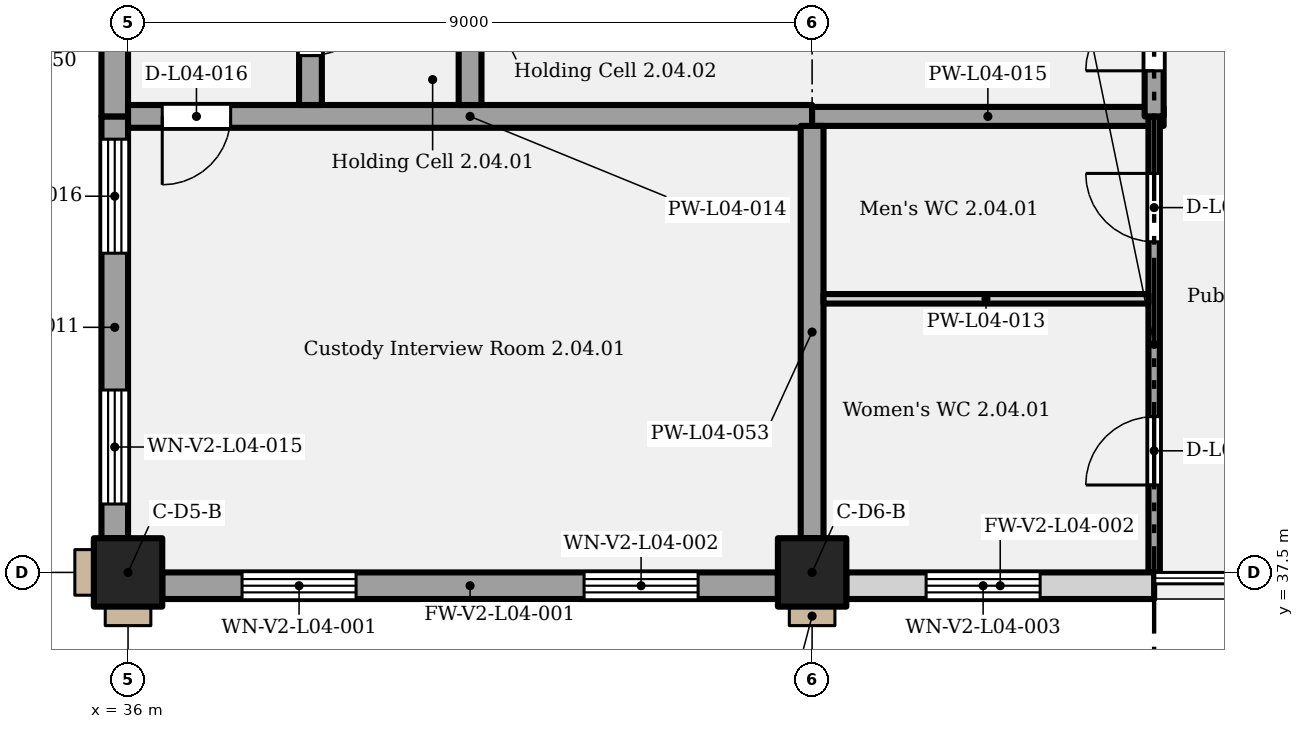
"""IFC4 building model, lengths in metres.
Left out: names, types, materials, properties, quantities, classifications, styles, units other than length and angle.
Written with IfcOpenShell. Run it as: python <this file> out.ifc"""

import sys

from ifc_helpers import new_model, si_unit, direction, frame, frame_2d, origin, origin_2d, place, context, subcontext, project, spatial, rectangle, extrude, element, fill, save


model = new_model("IFC4")
c1 = context("Model", 3, precision=1e-05, world=origin(), true_north=direction((0.0, 1.0)))
c2 = subcontext(c1, "Body", "Model", "MODEL_VIEW")
j1 = project(units=[si_unit("LENGTHUNIT", "METRE"), si_unit("PLANEANGLEUNIT", "RADIAN")], contexts=[c1])
p1 = place(None, origin())
s1 = spatial("IfcSite", under=j1, at=p1, CompositionType="ELEMENT")
p2 = place(p1, origin())
s2 = spatial("IfcBuilding", under=s1, at=p2, CompositionType="ELEMENT")
p3 = place(p2, frame((0.0, 0.0, 22.8)))
s3 = spatial("IfcBuildingStorey", under=s2, at=p3, CompositionType="ELEMENT", Elevation=22.8)
for number, where, z_axis, x_axis in (
    (1, (36.0, 37.5, 0.0), (0.0, 0.0, 1.0), (1.0, 0.0, 0.0)),
    (2, (45.0, 37.5, 0.0), (0.0, 0.0, 1.0), (1.0, 0.0, 0.0)),
):
    element("IfcColumn", number, at=place(p3, frame(where, z_axis=z_axis, x_axis=x_axis)), inside=s3, PredefinedType="COLUMN", context=c2, shape_type="SweptSolid", body=[
        extrude(rectangle(XDim=0.9, YDim=0.9, at=origin_2d()), origin(), (0.0, 0.0, 1.0), 5.4),
    ])
p4 = place(p3, frame((36.45, 37.325, 0.0), z_axis=(0.0, 0.0, 1.0), x_axis=(1.0, 0.0, 0.0)))
e3 = element("IfcWall", 3, at=p4, inside=s3, PredefinedType="SOLIDWALL", context=c2, shape_type="SweptSolid", body=[
    extrude(rectangle(XDim=8.1, YDim=0.35, at=frame_2d((4.05, 0.0))), origin(), (0.0, 0.0, 1.0), 5.15),
])
p5 = place(p4, frame((1.05, 0.0, 1.05)))
e4 = element("IfcOpeningElement", 4, at=p5, cuts=e3, PredefinedType="OPENING", context=c2, shape_type="SweptSolid", body=[
    extrude(rectangle(XDim=1.5, YDim=3.5, at=frame_2d((0.75, 1.75))), frame((0.0, 0.185, 0.0), z_axis=(0.0, -1.0, 0.0), x_axis=(1.0, 0.0, 0.0)), (0.0, 0.0, 1.0), 0.37),
])
p6 = place(p4, frame((5.55, 0.0, 1.05)))
e5 = element("IfcOpeningElement", 5, at=p6, cuts=e3, PredefinedType="OPENING", context=c2, shape_type="SweptSolid", body=[
    extrude(rectangle(XDim=1.5, YDim=3.5, at=frame_2d((0.75, 1.75))), frame((0.0, 0.185, 0.0), z_axis=(0.0, -1.0, 0.0), x_axis=(1.0, 0.0, 0.0)), (0.0, 0.0, 1.0), 0.37),
])
p7 = place(p3, frame((45.45, 37.325, 0.0), z_axis=(0.0, 0.0, 1.0), x_axis=(1.0, 0.0, 0.0)))
e6 = element("IfcWall", 6, at=p7, inside=s3, PredefinedType="SOLIDWALL", context=c2, shape_type="SweptSolid", body=[
    extrude(rectangle(XDim=4.05, YDim=0.35, at=frame_2d((2.025, 0.0))), origin(), (0.0, 0.0, 1.0), 5.15),
])
p8 = place(p7, frame((1.05, 0.0, 1.05)))
e7 = element("IfcOpeningElement", 7, at=p8, cuts=e6, PredefinedType="OPENING", context=c2, shape_type="SweptSolid", body=[
    extrude(rectangle(XDim=1.5, YDim=3.5, at=frame_2d((0.75, 1.75))), frame((0.0, 0.185, 0.0), z_axis=(0.0, -1.0, 0.0), x_axis=(1.0, 0.0, 0.0)), (0.0, 0.0, 1.0), 0.37),
])
p9 = place(p3, frame((35.825, 37.95, 0.0), z_axis=(0.0, 0.0, 1.0), x_axis=(0.0, 1.0, 0.0)))
e8 = element("IfcWall", 8, at=p9, inside=s3, PredefinedType="SOLIDWALL", context=c2, shape_type="SweptSolid", body=[
    extrude(rectangle(XDim=5.55, YDim=0.35, at=frame_2d((2.775, 0.0))), origin(), (0.0, 0.0, 1.0), 5.15),
])
p10 = place(p9, frame((0.45, 0.0, 1.05)))
e9 = element("IfcOpeningElement", 9, at=p10, cuts=e8, PredefinedType="OPENING", context=c2, shape_type="SweptSolid", body=[
    extrude(rectangle(XDim=1.5, YDim=3.5, at=frame_2d((0.75, 1.75))), frame((0.0, 0.185, 0.0), z_axis=(0.0, -1.0, 0.0), x_axis=(1.0, 0.0, 0.0)), (0.0, 0.0, 1.0), 0.37),
])
p11 = place(p9, frame((3.75, 0.0, 1.05)))
e10 = element("IfcOpeningElement", 10, at=p11, cuts=e8, PredefinedType="OPENING", context=c2, shape_type="SweptSolid", body=[
    extrude(rectangle(XDim=1.5, YDim=3.5, at=frame_2d((0.75, 1.75))), frame((0.0, 0.185, 0.0), z_axis=(0.0, -1.0, 0.0), x_axis=(1.0, 0.0, 0.0)), (0.0, 0.0, 1.0), 0.37),
])
p12 = place(p3, frame((35.825, 43.5, 0.0), z_axis=(0.0, 0.0, 1.0), x_axis=(0.0, 1.0, 0.0)))
e11 = element("IfcWall", 11, at=p12, inside=s3, PredefinedType="SOLIDWALL", context=c2, shape_type="SweptSolid", body=[
    extrude(rectangle(XDim=10.05, YDim=0.35, at=frame_2d((5.025, 0.0))), origin(), (0.0, 0.0, 1.0), 5.15),
])
p13 = place(p12, frame((1.5, 0.0, 1.05)))
e12 = element("IfcOpeningElement", 12, at=p13, cuts=e11, PredefinedType="OPENING", context=c2, shape_type="SweptSolid", body=[
    extrude(rectangle(XDim=1.5, YDim=3.5, at=frame_2d((0.75, 1.75))), frame((0.0, 0.185, 0.0), z_axis=(0.0, -1.0, 0.0), x_axis=(1.0, 0.0, 0.0)), (0.0, 0.0, 1.0), 0.37),
])
p14 = place(p12, frame((4.8, 0.0, 1.05)))
e13 = element("IfcOpeningElement", 13, at=p14, cuts=e11, PredefinedType="OPENING", context=c2, shape_type="SweptSolid", body=[
    extrude(rectangle(XDim=1.5, YDim=3.5, at=frame_2d((0.75, 1.75))), frame((0.0, 0.185, 0.0), z_axis=(0.0, -1.0, 0.0), x_axis=(1.0, 0.0, 0.0)), (0.0, 0.0, 1.0), 0.37),
])
p15 = place(p12, frame((8.1, 0.0, 1.05)))
e14 = element("IfcOpeningElement", 14, at=p15, cuts=e11, PredefinedType="OPENING", context=c2, shape_type="SweptSolid", body=[
    extrude(rectangle(XDim=1.5, YDim=3.5, at=frame_2d((0.75, 1.75))), frame((0.0, 0.185, 0.0), z_axis=(0.0, -1.0, 0.0), x_axis=(1.0, 0.0, 0.0)), (0.0, 0.0, 1.0), 0.37),
])
p16 = place(p3, frame((45.15, 41.1, 0.0), z_axis=(0.0, 0.0, 1.0), x_axis=(1.0, 0.0, 0.0)))
e15 = element("IfcWall", 15, at=p16, inside=s3, PredefinedType="PARTITIONING", context=c2, shape_type="SweptSolid", body=[
    extrude(rectangle(XDim=4.275, YDim=0.125, at=frame_2d((2.138, 0.0))), origin(), (0.0, 0.0, 1.0), 5.15),
])
p17 = place(p3, frame((36.0, 43.5, 0.0), z_axis=(0.0, 0.0, 1.0), x_axis=(1.0, 0.0, 0.0)))
e16 = element("IfcWall", 16, at=p17, inside=s3, PredefinedType="PARTITIONING", context=c2, shape_type="SweptSolid", body=[
    extrude(rectangle(XDim=9.0, YDim=0.3, at=frame_2d((4.5, 0.0))), origin(), (0.0, 0.0, 1.0), 5.15),
])
p18 = place(p17, frame((1.35, 0.0, 0.0), z_axis=(0.0, 0.0, 1.0), x_axis=(-1.0, 0.0, 0.0)))
e17 = element("IfcOpeningElement", 17, at=p18, cuts=e16, PredefinedType="OPENING", context=c2, shape_type="SweptSolid", body=[
    extrude(rectangle(XDim=0.9, YDim=2.1, at=frame_2d((0.45, 1.05))), frame((0.0, 0.16, 0.0), z_axis=(0.0, -1.0, 0.0), x_axis=(1.0, 0.0, 0.0)), (0.0, 0.0, 1.0), 0.32),
])
p19 = place(p3, frame((45.0, 43.5, 0.0), z_axis=(0.0, 0.0, 1.0), x_axis=(1.0, 0.0, 0.0)))
e18 = element("IfcWall", 18, at=p19, inside=s3, PredefinedType="PARTITIONING", context=c2, shape_type="SweptSolid", body=[
    extrude(rectangle(XDim=4.625, YDim=0.25, at=frame_2d((2.312, 0.0))), origin(), (0.0, 0.0, 1.0), 5.15),
])
p20 = place(p3, frame((38.4, 43.65, 0.0), z_axis=(0.0, 0.0, 1.0), x_axis=(0.0, 1.0, 0.0)))
e19 = element("IfcWall", 19, at=p20, inside=s3, PredefinedType="PARTITIONING", context=c2, shape_type="SweptSolid", body=[
    extrude(rectangle(XDim=10.35, YDim=0.3, at=frame_2d((5.175, 0.0))), origin(), (0.0, 0.0, 1.0), 5.15),
])
p21 = place(p20, frame((1.55, 0.0, 0.0), z_axis=(0.0, 0.0, 1.0), x_axis=(-1.0, 0.0, 0.0)))
e20 = element("IfcOpeningElement", 20, at=p21, cuts=e19, PredefinedType="OPENING", context=c2, shape_type="SweptSolid", body=[
    extrude(rectangle(XDim=0.9, YDim=2.0, at=frame_2d((0.45, 1.0))), frame((0.0, 0.16, 0.0), z_axis=(0.0, -1.0, 0.0), x_axis=(1.0, 0.0, 0.0)), (0.0, 0.0, 1.0), 0.32),
])
p22 = place(p20, frame((4.05, 0.0, 0.0), z_axis=(0.0, 0.0, 1.0), x_axis=(-1.0, 0.0, 0.0)))
e21 = element("IfcOpeningElement", 21, at=p22, cuts=e19, PredefinedType="OPENING", context=c2, shape_type="SweptSolid", body=[
    extrude(rectangle(XDim=0.9, YDim=2.0, at=frame_2d((0.45, 1.0))), frame((0.0, 0.16, 0.0), z_axis=(0.0, -1.0, 0.0), x_axis=(1.0, 0.0, 0.0)), (0.0, 0.0, 1.0), 0.32),
])
p23 = place(p20, frame((6.55, 0.0, 0.0), z_axis=(0.0, 0.0, 1.0), x_axis=(-1.0, 0.0, 0.0)))
e22 = element("IfcOpeningElement", 22, at=p23, cuts=e19, PredefinedType="OPENING", context=c2, shape_type="SweptSolid", body=[
    extrude(rectangle(XDim=0.9, YDim=2.0, at=frame_2d((0.45, 1.0))), frame((0.0, 0.16, 0.0), z_axis=(0.0, -1.0, 0.0), x_axis=(1.0, 0.0, 0.0)), (0.0, 0.0, 1.0), 0.32),
])
p24 = place(p20, frame((9.3, 0.0, 0.0), z_axis=(0.0, 0.0, 1.0), x_axis=(-1.0, 0.0, 0.0)))
e23 = element("IfcOpeningElement", 23, at=p24, cuts=e19, PredefinedType="OPENING", context=c2, shape_type="SweptSolid", body=[
    extrude(rectangle(XDim=0.9, YDim=2.0, at=frame_2d((0.45, 1.0))), frame((0.0, 0.16, 0.0), z_axis=(0.0, -1.0, 0.0), x_axis=(1.0, 0.0, 0.0)), (0.0, 0.0, 1.0), 0.32),
])
p25 = place(p3, frame((40.5, 43.65, 0.0), z_axis=(0.0, 0.0, 1.0), x_axis=(0.0, 1.0, 0.0)))
e24 = element("IfcWall", 24, at=p25, inside=s3, PredefinedType="PARTITIONING", context=c2, shape_type="SweptSolid", body=[
    extrude(rectangle(XDim=10.35, YDim=0.3, at=frame_2d((5.175, 0.0))), origin(), (0.0, 0.0, 1.0), 5.15),
])
p26 = place(p25, frame((9.35, 0.0, 0.0), z_axis=(0.0, 0.0, 1.0), x_axis=(-1.0, 0.0, 0.0)))
e25 = element("IfcOpeningElement", 25, at=p26, cuts=e24, PredefinedType="OPENING", context=c2, shape_type="SweptSolid", body=[
    extrude(rectangle(XDim=1.0, YDim=2.0, at=frame_2d((0.5, 1.0))), frame((0.0, 0.16, 0.0), z_axis=(0.0, -1.0, 0.0), x_axis=(1.0, 0.0, 0.0)), (0.0, 0.0, 1.0), 0.32),
])
p27 = place(p3, frame((45.0, 37.95, 0.0), z_axis=(0.0, 0.0, 1.0), x_axis=(0.0, 1.0, 0.0)))
e26 = element("IfcWall", 26, at=p27, inside=s3, PredefinedType="PARTITIONING", context=c2, shape_type="SweptSolid", body=[
    extrude(rectangle(XDim=5.425, YDim=0.3, at=frame_2d((2.712, 0.0))), origin(), (0.0, 0.0, 1.0), 4.2),
])
p28 = place(p3, frame((49.5, 37.5, 0.0), z_axis=(0.0, 0.0, 1.0), x_axis=(0.0, 1.0, 0.0)))
e27 = element("IfcWall", 27, at=p28, inside=s3, PredefinedType="PARTITIONING", context=c2, shape_type="SweptSolid", body=[
    extrude(rectangle(XDim=6.0, YDim=0.15, at=frame_2d((3.0, 0.0))), origin(), (0.0, 0.0, 1.0), 5.15),
])
p29 = place(p28, frame((1.15, 0.0, 0.0)))
e28 = element("IfcOpeningElement", 28, at=p29, cuts=e27, PredefinedType="OPENING", context=c2, shape_type="SweptSolid", body=[
    extrude(rectangle(XDim=0.9, YDim=2.1, at=frame_2d((0.45, 1.05))), frame((0.0, 0.085, 0.0), z_axis=(0.0, -1.0, 0.0), x_axis=(1.0, 0.0, 0.0)), (0.0, 0.0, 1.0), 0.17),
])
p30 = place(p28, frame((4.35, 0.0, 0.0)))
e29 = element("IfcOpeningElement", 29, at=p30, cuts=e27, PredefinedType="OPENING", context=c2, shape_type="SweptSolid", body=[
    extrude(rectangle(XDim=0.9, YDim=2.1, at=frame_2d((0.45, 1.05))), frame((0.0, 0.085, 0.0), z_axis=(0.0, -1.0, 0.0), x_axis=(1.0, 0.0, 0.0)), (0.0, 0.0, 1.0), 0.17),
])
p31 = place(p3, frame((49.5, 43.5, 0.0), z_axis=(0.0, 0.0, 1.0), x_axis=(0.0, 1.0, 0.0)))
e30 = element("IfcWall", 30, at=p31, inside=s3, PredefinedType="PARTITIONING", context=c2, shape_type="SweptSolid", body=[
    extrude(rectangle(XDim=10.5, YDim=0.25, at=frame_2d((5.25, 0.0))), origin(), (0.0, 0.0, 1.0), 5.15),
])
p32 = place(p31, frame((0.6, 0.0, 0.0)))
e31 = element("IfcOpeningElement", 31, at=p32, cuts=e30, PredefinedType="OPENING", context=c2, shape_type="SweptSolid", body=[
    extrude(rectangle(XDim=1.8, YDim=2.4, at=frame_2d((0.9, 1.2))), frame((0.0, 0.135, 0.0), z_axis=(0.0, -1.0, 0.0), x_axis=(1.0, 0.0, 0.0)), (0.0, 0.0, 1.0), 0.27),
])
p33 = place(p31, frame((7.1, 0.0, 0.0)))
e32 = element("IfcOpeningElement", 32, at=p33, cuts=e30, PredefinedType="OPENING", context=c2, shape_type="SweptSolid", body=[
    extrude(rectangle(XDim=1.8, YDim=2.4, at=frame_2d((0.9, 1.2))), frame((0.0, 0.135, 0.0), z_axis=(0.0, -1.0, 0.0), x_axis=(1.0, 0.0, 0.0)), (0.0, 0.0, 1.0), 0.27),
])
p34 = place(p5, origin())
e33 = element("IfcWindow", 33, at=p34, inside=s3, PartitioningType="SINGLE_PANEL", PredefinedType="WINDOW", context=c2, shape_type="SweptSolid", body=[
    extrude(rectangle(XDim=1.5, YDim=3.5, at=frame_2d((0.75, 1.75))), frame((0.0, 0.03, 0.0), z_axis=(0.0, -1.0, 0.0), x_axis=(1.0, 0.0, 0.0)), (0.0, 0.0, 1.0), 0.06),
])
fill(e4, e33)
p35 = place(p6, origin())
e34 = element("IfcWindow", 34, at=p35, inside=s3, PartitioningType="SINGLE_PANEL", PredefinedType="WINDOW", context=c2, shape_type="SweptSolid", body=[
    extrude(rectangle(XDim=1.5, YDim=3.5, at=frame_2d((0.75, 1.75))), frame((0.0, 0.03, 0.0), z_axis=(0.0, -1.0, 0.0), x_axis=(1.0, 0.0, 0.0)), (0.0, 0.0, 1.0), 0.06),
])
fill(e5, e34)
p36 = place(p8, origin())
e35 = element("IfcWindow", 35, at=p36, inside=s3, PartitioningType="SINGLE_PANEL", PredefinedType="WINDOW", context=c2, shape_type="SweptSolid", body=[
    extrude(rectangle(XDim=1.5, YDim=3.5, at=frame_2d((0.75, 1.75))), frame((0.0, 0.03, 0.0), z_axis=(0.0, -1.0, 0.0), x_axis=(1.0, 0.0, 0.0)), (0.0, 0.0, 1.0), 0.06),
])
fill(e7, e35)
p37 = place(p10, origin())
e36 = element("IfcWindow", 36, at=p37, inside=s3, PartitioningType="SINGLE_PANEL", PredefinedType="WINDOW", context=c2, shape_type="SweptSolid", body=[
    extrude(rectangle(XDim=1.5, YDim=3.5, at=frame_2d((0.75, 1.75))), frame((0.0, 0.03, 0.0), z_axis=(0.0, -1.0, 0.0), x_axis=(1.0, 0.0, 0.0)), (0.0, 0.0, 1.0), 0.06),
])
fill(e9, e36)
p38 = place(p11, origin())
e37 = element("IfcWindow", 37, at=p38, inside=s3, PartitioningType="SINGLE_PANEL", PredefinedType="WINDOW", context=c2, shape_type="SweptSolid", body=[
    extrude(rectangle(XDim=1.5, YDim=3.5, at=frame_2d((0.75, 1.75))), frame((0.0, 0.03, 0.0), z_axis=(0.0, -1.0, 0.0), x_axis=(1.0, 0.0, 0.0)), (0.0, 0.0, 1.0), 0.06),
])
fill(e10, e37)
p39 = place(p32, origin())
e38 = element("IfcDoor", 38, at=p39, inside=s3, OperationType="DOUBLE_DOOR_SINGLE_SWING", PredefinedType="DOOR", context=c2, shape_type="SweptSolid", body=[
    extrude(rectangle(XDim=1.8, YDim=2.4, at=frame_2d((0.9, 1.2))), frame((0.0, 0.025, 0.0), z_axis=(0.0, -1.0, 0.0), x_axis=(1.0, 0.0, 0.0)), (0.0, 0.0, 1.0), 0.05),
])
fill(e31, e38)
p40 = place(p18, origin())
e39 = element("IfcDoor", 39, at=p40, inside=s3, OperationType="SINGLE_SWING_RIGHT", PredefinedType="DOOR", context=c2, shape_type="SweptSolid", body=[
    extrude(rectangle(XDim=0.9, YDim=2.1, at=frame_2d((0.45, 1.05))), frame((0.0, 0.025, 0.0), z_axis=(0.0, -1.0, 0.0), x_axis=(1.0, 0.0, 0.0)), (0.0, 0.0, 1.0), 0.05),
])
fill(e17, e39)
p41 = place(p21, origin())
e40 = element("IfcDoor", 40, at=p41, inside=s3, OperationType="SINGLE_SWING_LEFT", PredefinedType="DOOR", context=c2, shape_type="SweptSolid", body=[
    extrude(rectangle(XDim=0.9, YDim=2.0, at=frame_2d((0.45, 1.0))), frame((0.0, 0.025, 0.0), z_axis=(0.0, -1.0, 0.0), x_axis=(1.0, 0.0, 0.0)), (0.0, 0.0, 1.0), 0.05),
])
fill(e20, e40)
p42 = place(p29, origin())
e41 = element("IfcDoor", 41, at=p42, inside=s3, OperationType="SINGLE_SWING_LEFT", PredefinedType="DOOR", context=c2, shape_type="SweptSolid", body=[
    extrude(rectangle(XDim=0.9, YDim=2.1, at=frame_2d((0.45, 1.05))), frame((0.0, 0.025, 0.0), z_axis=(0.0, -1.0, 0.0), x_axis=(1.0, 0.0, 0.0)), (0.0, 0.0, 1.0), 0.05),
])
fill(e28, e41)
p43 = place(p30, origin())
e42 = element("IfcDoor", 42, at=p43, inside=s3, OperationType="SINGLE_SWING_RIGHT", PredefinedType="DOOR", context=c2, shape_type="SweptSolid", body=[
    extrude(rectangle(XDim=0.9, YDim=2.1, at=frame_2d((0.45, 1.05))), frame((0.0, 0.025, 0.0), z_axis=(0.0, -1.0, 0.0), x_axis=(1.0, 0.0, 0.0)), (0.0, 0.0, 1.0), 0.05),
])
fill(e29, e42)
save(model, sys.argv[1])
